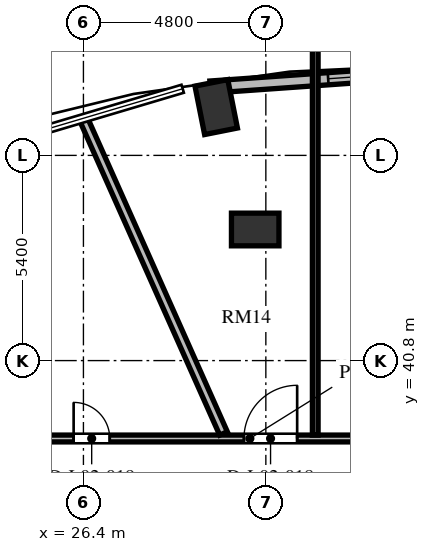
"""IFC4 building model, lengths in metres.
Left out: names, types, materials, properties, quantities, classifications, styles, units other than length and angle.
Written with IfcOpenShell. Run it as: python <this file> out.ifc"""

import sys

from ifc_helpers import new_model, si_unit, direction, frame, frame_2d, origin, origin_2d, place, context, subcontext, project, spatial, rectangle, extrude, element, fill, save


model = new_model("IFC4")
c1 = context("Model", 3, precision=1e-05, world=origin(), true_north=direction((0.0, 1.0)))
c2 = subcontext(c1, "Body", "Model", "MODEL_VIEW")
j1 = project(units=[si_unit("LENGTHUNIT", "METRE"), si_unit("PLANEANGLEUNIT", "RADIAN")], contexts=[c1])
p1 = place(None, origin())
s1 = spatial("IfcSite", under=j1, at=p1, CompositionType="ELEMENT")
p2 = place(p1, origin())
s2 = spatial("IfcBuilding", under=s1, at=p2, CompositionType="ELEMENT")
p3 = place(p2, frame((0.0, 0.0, 10.8)))
s3 = spatial("IfcBuildingStorey", under=s2, at=p3, CompositionType="ELEMENT", Elevation=10.8)
p4 = place(p3, frame((29.894, 47.471, 0.0), z_axis=(0.0, 0.0, 1.0), x_axis=(-0.195090322016, 0.980785280403, 0.0)))
e1 = element("IfcColumn", 1, at=p4, inside=s3, PredefinedType="COLUMN", context=c2, shape_type="SweptSolid", body=[
    extrude(rectangle(XDim=1.3, YDim=0.88, at=origin_2d()), origin(), (0.0, 0.0, 1.0), 4.8),
])
p5 = place(p3, frame((30.92, 44.25, 0.0), z_axis=(0.0, 0.0, 1.0), x_axis=(1.0, 0.0, 0.0)))
e2 = element("IfcColumn", 2, at=p5, inside=s3, PredefinedType="COLUMN", context=c2, shape_type="SweptSolid", body=[
    extrude(rectangle(XDim=1.25, YDim=0.86, at=origin_2d()), origin(), (0.0, 0.0, 1.0), 4.8),
])
p6 = place(p3, frame((36.179, 48.453, 0.0), z_axis=(0.0, 0.0, 1.0), x_axis=(-0.997513108184, -0.070481196075, 0.0)))
e3 = element("IfcWall", 3, at=p6, inside=s3, PredefinedType="SOLIDWALL", context=c2, shape_type="SweptSolid", body=[
    extrude(rectangle(XDim=6.457, YDim=0.32, at=frame_2d((3.229, 0.0))), origin(), (0.0, 0.0, 1.0), 4.52),
])
p7 = place(p6, frame((1.548, 0.0, 0.85)))
e4 = element("IfcOpeningElement", 4, at=p7, cuts=e3, PredefinedType="OPENING", context=c2, shape_type="SweptSolid", body=[
    extrude(rectangle(XDim=1.8, YDim=2.4, at=frame_2d((0.9, 1.2))), frame((0.0, 0.17, 0.0), z_axis=(0.0, -1.0, 0.0), x_axis=(1.0, 0.0, 0.0)), (0.0, 0.0, 1.0), 0.34),
])
p8 = place(p3, frame((23.31, 38.75, 0.0), z_axis=(0.0, 0.0, 1.0), x_axis=(1.0, 0.0, 0.0)))
e5 = element("IfcWall", 5, at=p8, inside=s3, PredefinedType="PARTITIONING", context=c2, shape_type="SweptSolid", body=[
    extrude(rectangle(XDim=29.88, YDim=0.18, at=frame_2d((14.94, 0.0))), origin(), (0.0, 0.0, 1.0), 4.52),
])
p9 = place(p8, frame((25.211, 0.0, 0.0)))
e6 = element("IfcOpeningElement", 6, at=p9, cuts=e5, PredefinedType="OPENING", context=c2, shape_type="SweptSolid", body=[
    extrude(rectangle(XDim=1.4, YDim=2.2, at=frame_2d((0.7, 1.1))), frame((0.0, 0.1, 0.0), z_axis=(0.0, -1.0, 0.0), x_axis=(1.0, 0.0, 0.0)), (0.0, 0.0, 1.0), 0.2),
])
p10 = place(p8, frame((18.158, 0.0, 0.0)))
e7 = element("IfcOpeningElement", 7, at=p10, cuts=e5, PredefinedType="OPENING", context=c2, shape_type="SweptSolid", body=[
    extrude(rectangle(XDim=1.05, YDim=2.15, at=frame_2d((0.525, 1.075))), frame((0.0, 0.1, 0.0), z_axis=(0.0, -1.0, 0.0), x_axis=(1.0, 0.0, 0.0)), (0.0, 0.0, 1.0), 0.2),
])
p11 = place(p8, frame((11.785, 0.0, 0.0)))
e8 = element("IfcOpeningElement", 8, at=p11, cuts=e5, PredefinedType="OPENING", context=c2, shape_type="SweptSolid", body=[
    extrude(rectangle(XDim=1.05, YDim=2.15, at=frame_2d((0.525, 1.075))), frame((0.0, 0.1, 0.0), z_axis=(0.0, -1.0, 0.0), x_axis=(1.0, 0.0, 0.0)), (0.0, 0.0, 1.0), 0.2),
])
p12 = place(p8, frame((7.314, 0.0, 0.0)))
e9 = element("IfcOpeningElement", 9, at=p12, cuts=e5, PredefinedType="OPENING", context=c2, shape_type="SweptSolid", body=[
    extrude(rectangle(XDim=1.4, YDim=2.2, at=frame_2d((0.7, 1.1))), frame((0.0, 0.1, 0.0), z_axis=(0.0, -1.0, 0.0), x_axis=(1.0, 0.0, 0.0)), (0.0, 0.0, 1.0), 0.2),
])
p13 = place(p8, frame((2.832, 0.0, 0.0)))
e10 = element("IfcOpeningElement", 10, at=p13, cuts=e5, PredefinedType="OPENING", context=c2, shape_type="SweptSolid", body=[
    extrude(rectangle(XDim=0.95, YDim=2.1, at=frame_2d((0.475, 1.05))), frame((0.0, 0.1, 0.0), z_axis=(0.0, -1.0, 0.0), x_axis=(1.0, 0.0, 0.0)), (0.0, 0.0, 1.0), 0.2),
])
p14 = place(p3, frame((30.086, 38.883, 0.0), z_axis=(0.0, 0.0, 1.0), x_axis=(-0.406742961245, 0.913542644586, 0.0)))
e11 = element("IfcWall", 11, at=p14, inside=s3, PredefinedType="PARTITIONING", context=c2, shape_type="SweptSolid", body=[
    extrude(rectangle(XDim=9.067, YDim=0.22, at=frame_2d((4.534, 0.0))), origin(), (0.0, 0.0, 1.0), 4.52),
])
p15 = place(p3, frame((32.5, 38.84, 0.0), z_axis=(0.0, 0.0, 1.0), x_axis=(0.0, 1.0, 0.0)))
e12 = element("IfcWall", 12, at=p15, inside=s3, PredefinedType="PARTITIONING", context=c2, shape_type="SweptSolid", body=[
    extrude(rectangle(XDim=10.959, YDim=0.15, at=frame_2d((5.48, 0.0))), origin(), (0.0, 0.0, 1.0), 4.52),
])
p16 = place(p7, origin())
e13 = element("IfcWindow", 13, at=p16, inside=s3, PartitioningType="SINGLE_PANEL", PredefinedType="WINDOW", context=c2, shape_type="SweptSolid", body=[
    extrude(rectangle(XDim=1.8, YDim=2.4, at=frame_2d((0.9, 1.2))), frame((0.0, 0.03, 0.0), z_axis=(0.0, -1.0, 0.0), x_axis=(1.0, 0.0, 0.0)), (0.0, 0.0, 1.0), 0.06),
])
fill(e4, e13)
p17 = place(p12, origin())
e14 = element("IfcDoor", 14, at=p17, inside=s3, OperationType="SINGLE_SWING_RIGHT", PredefinedType="DOOR", context=c2, shape_type="SweptSolid", body=[
    extrude(rectangle(XDim=1.4, YDim=2.2, at=frame_2d((0.7, 1.1))), frame((0.0, 0.025, 0.0), z_axis=(0.0, -1.0, 0.0), x_axis=(1.0, 0.0, 0.0)), (0.0, 0.0, 1.0), 0.05),
])
fill(e9, e14)
p18 = place(p13, origin())
e15 = element("IfcDoor", 15, at=p18, inside=s3, OperationType="SINGLE_SWING_LEFT", PredefinedType="DOOR", context=c2, shape_type="SweptSolid", body=[
    extrude(rectangle(XDim=0.95, YDim=2.1, at=frame_2d((0.475, 1.05))), frame((0.0, 0.025, 0.0), z_axis=(0.0, -1.0, 0.0), x_axis=(1.0, 0.0, 0.0)), (0.0, 0.0, 1.0), 0.05),
])
fill(e10, e15)
save(model, sys.argv[1])
